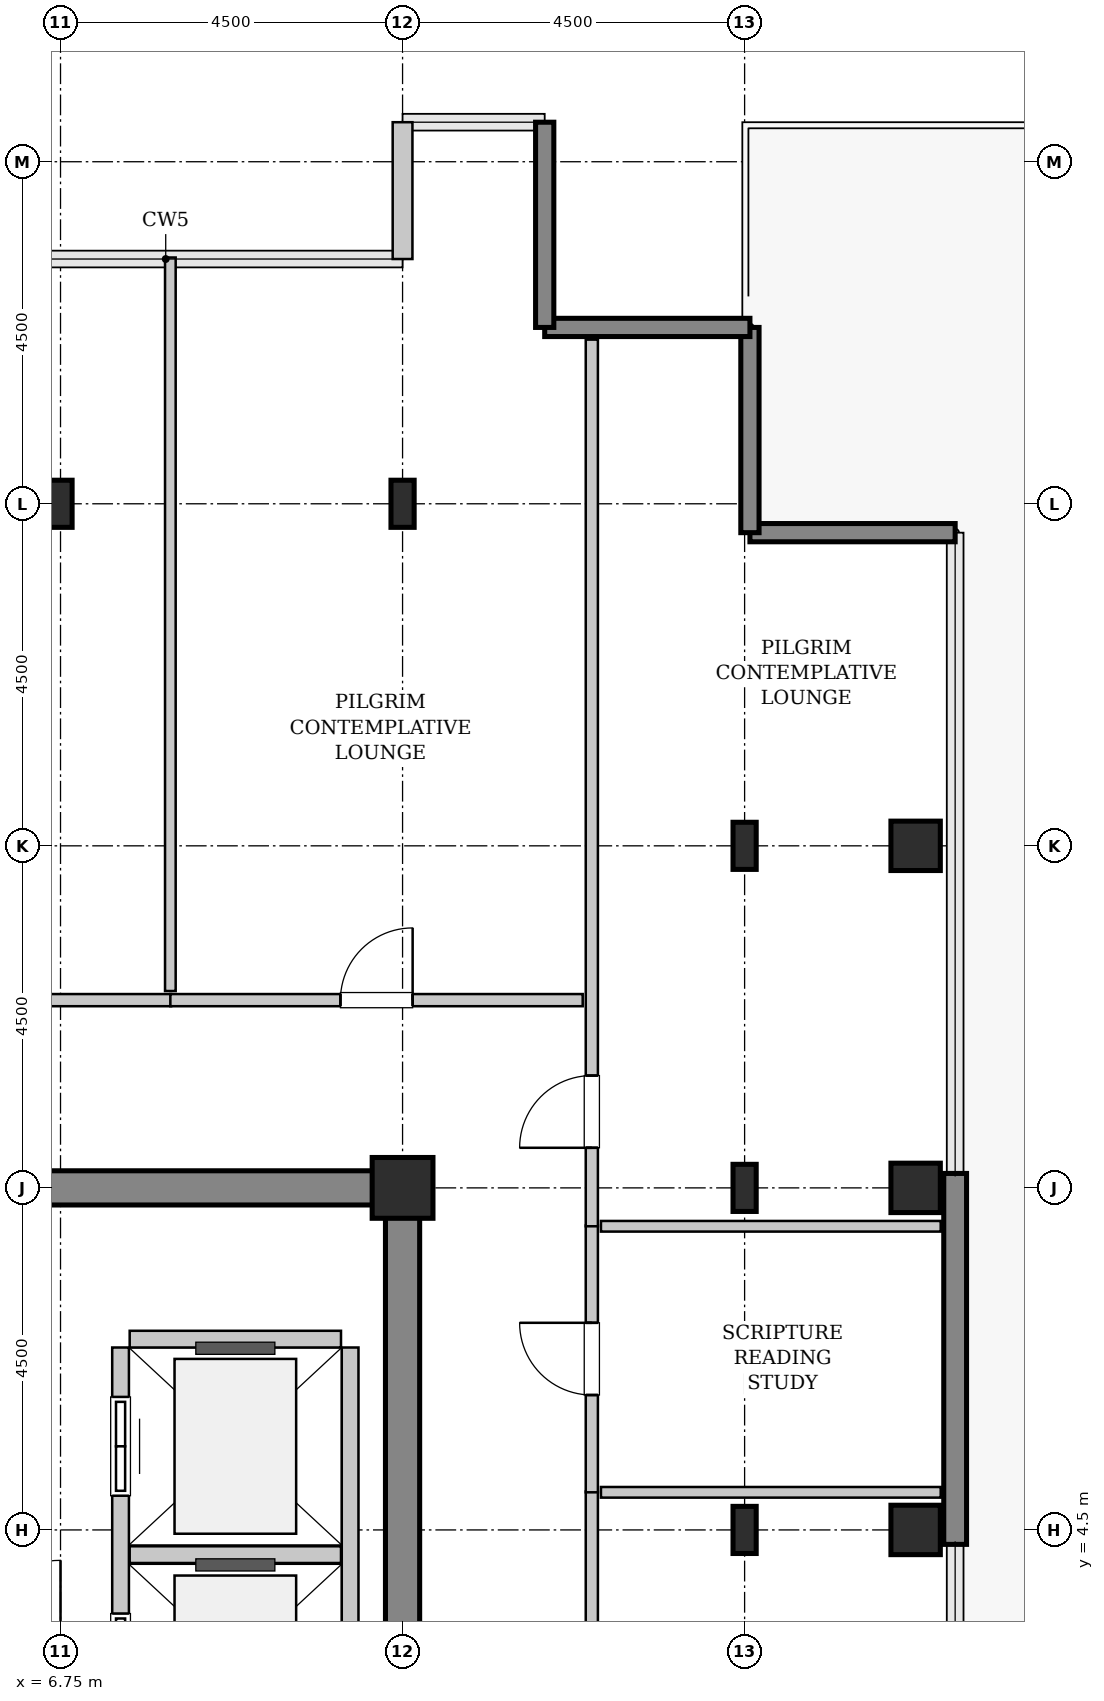
"""IFC4 building model, lengths in metres.
Left out: names, types, materials, properties, quantities, classifications, styles, units other than length and angle.
Written with IfcOpenShell. Run it as: python <this file> out.ifc"""

import sys

from ifc_helpers import new_model, si_unit, direction, frame, frame_2d, origin, origin_2d, place, context, subcontext, project, spatial, rectangle, hollow_rectangle, i_section, extrude, source, transform, mapped, element, fill, save


model = new_model("IFC4")
c1 = context("Model", 3, precision=1e-05, world=origin(), true_north=direction((0.0, 1.0)))
c2 = subcontext(c1, "Body", "Model", "MODEL_VIEW")
j1 = project(units=[si_unit("LENGTHUNIT", "METRE"), si_unit("PLANEANGLEUNIT", "RADIAN")], contexts=[c1])
p1 = place(None, origin())
s1 = spatial("IfcSite", under=j1, at=p1, CompositionType="ELEMENT")
p2 = place(p1, origin())
s2 = spatial("IfcBuilding", under=s1, at=p2, CompositionType="ELEMENT")
p3 = place(p2, frame((0.0, 0.0, 264.6)))
s3 = spatial("IfcBuildingStorey", under=s2, at=p3, CompositionType="ELEMENT", Elevation=264.6)
m1 = source(origin(), c2, "Body", "SweptSolid", [
    extrude(rectangle(XDim=9.925, YDim=0.45, at=frame_2d((4.962, 0.0))), origin(), (0.0, 0.0, 1.0), 3.8),
])
p4 = place(p3, frame((1.55, 9.0, 0.0), z_axis=(0.0, 0.0, 1.0), x_axis=(1.0, 0.0, 0.0)))
e1 = element("IfcWall", 1, at=p4, inside=s3, PredefinedType="SHEAR", context=c2, shape_type="MappedRepresentation", body=[
    mapped(m1, transform((0.0, 0.0, 0.0), x_axis=(1.0, 0.0, 0.0), y_axis=(0.0, 1.0, 0.0), z_axis=(0.0, 0.0, 1.0), scale=1.0)),
])
m2 = source(origin(), c2, "Body", "SweptSolid", [
    extrude(rectangle(XDim=7.425, YDim=0.45, at=frame_2d((3.712, 0.0))), origin(), (0.0, 0.0, 1.0), 3.8),
])
p5 = place(p3, frame((11.25, 1.35, 0.0), z_axis=(0.0, 0.0, 1.0), x_axis=(0.0, 1.0, 0.0)))
e2 = element("IfcWall", 2, at=p5, inside=s3, PredefinedType="SHEAR", context=c2, shape_type="MappedRepresentation", body=[
    mapped(m2, transform((0.0, 0.0, 0.0), x_axis=(1.0, 0.0, 0.0), y_axis=(0.0, 1.0, 0.0), z_axis=(0.0, 0.0, 1.0), scale=1.0)),
])
m3 = source(origin(), c2, "Body", "SweptSolid", [
    extrude(i_section(OverallWidth=0.305, OverallDepth=0.62, WebThickness=0.021, FlangeThickness=0.04, FilletRadius=0.027, at=origin_2d()), origin(), (0.0, 0.0, 1.0), 3.8),
])
p6 = place(p3, frame((6.75, 18.0, 0.0), z_axis=(0.0, 0.0, 1.0), x_axis=(1.0, 0.0, 0.0)))
e3 = element("IfcColumn", 3, at=p6, inside=s3, PredefinedType="COLUMN", context=c2, shape_type="MappedRepresentation", body=[
    mapped(m3, transform((0.0, 0.0, 0.0), x_axis=(1.0, 0.0, 0.0), y_axis=(0.0, 1.0, 0.0), z_axis=(0.0, 0.0, 1.0), scale=1.0)),
])
m4 = source(origin(), c2, "Body", "SweptSolid", [
    extrude(hollow_rectangle(XDim=0.8, YDim=0.8, WallThickness=0.04, InnerFilletRadius=0.04, OuterFilletRadius=0.08, at=origin_2d()), origin(), (0.0, 0.0, 1.0), 3.8),
])
p7 = place(p3, frame((11.25, 9.0, 0.0), z_axis=(0.0, 0.0, 1.0), x_axis=(1.0, 0.0, 0.0)))
e4 = element("IfcColumn", 4, at=p7, inside=s3, PredefinedType="COLUMN", context=c2, shape_type="MappedRepresentation", body=[
    mapped(m4, transform((0.0, 0.0, 0.0), x_axis=(1.0, 0.0, 0.0), y_axis=(0.0, 1.0, 0.0), z_axis=(0.0, 0.0, 1.0), scale=1.0)),
])
for number, where, z_axis, x_axis in (
    (5, (11.25, 18.0, 0.0), (0.0, 0.0, 1.0), (1.0, 0.0, 0.0)),
    (6, (15.75, 4.5, 0.0), (0.0, 0.0, 1.0), (1.0, 0.0, 0.0)),
    (7, (15.75, 9.0, 0.0), (0.0, 0.0, 1.0), (1.0, 0.0, 0.0)),
    (8, (15.75, 13.5, 0.0), (0.0, 0.0, 1.0), (1.0, 0.0, 0.0)),
):
    element("IfcColumn", number, at=place(p3, frame(where, z_axis=z_axis, x_axis=x_axis)), inside=s3, PredefinedType="COLUMN", context=c2, shape_type="MappedRepresentation", body=[
        mapped(m3, transform((0.0, 0.0, 0.0), x_axis=(1.0, 0.0, 0.0), y_axis=(0.0, 1.0, 0.0), z_axis=(0.0, 0.0, 1.0), scale=1.0)),
    ])
m5 = source(origin(), c2, "Body", "SweptSolid", [
    extrude(hollow_rectangle(XDim=0.65, YDim=0.65, WallThickness=0.032, InnerFilletRadius=0.032, OuterFilletRadius=0.064, at=origin_2d()), origin(), (0.0, 0.0, 1.0), 3.8),
])
for number, where, z_axis, x_axis in (
    (9, (18.0, 4.5, 0.0), (0.0, 0.0, 1.0), (1.0, 0.0, 0.0)),
    (10, (18.0, 9.0, 0.0), (0.0, 0.0, 1.0), (1.0, 0.0, 0.0)),
    (11, (18.0, 13.5, 0.0), (0.0, 0.0, 1.0), (1.0, 0.0, 0.0)),
):
    element("IfcColumn", number, at=place(p3, frame(where, z_axis=z_axis, x_axis=x_axis)), inside=s3, PredefinedType="COLUMN", context=c2, shape_type="MappedRepresentation", body=[
        mapped(m5, transform((0.0, 0.0, 0.0), x_axis=(1.0, 0.0, 0.0), y_axis=(0.0, 1.0, 0.0), z_axis=(0.0, 0.0, 1.0), scale=1.0)),
    ])
m6 = source(origin(), c2, "Body", "SweptSolid", [
    extrude(rectangle(XDim=4.88, YDim=0.3, at=frame_2d((2.44, 0.0))), origin(), (0.0, 0.0, 1.0), 3.55),
])
p8 = place(p3, frame((18.52, 4.31, 0.0), z_axis=(0.0, 0.0, 1.0), x_axis=(0.0, 1.0, 0.0)))
e12 = element("IfcWall", 12, at=p8, inside=s3, PredefinedType="SHEAR", context=c2, shape_type="MappedRepresentation", body=[
    mapped(m6, transform((0.0, 0.0, 0.0), x_axis=(1.0, 0.0, 0.0), y_axis=(0.0, 1.0, 0.0), z_axis=(0.0, 0.0, 1.0), scale=1.0)),
])
m7 = source(origin(), c2, "Body", "SweptSolid", [
    extrude(rectangle(XDim=2.7, YDim=0.24, at=frame_2d((1.35, 0.0))), origin(), (0.0, 0.0, 1.0), 3.55),
])
for number, where, z_axis, x_axis in (
    (13, (18.52, 17.62, 0.0), (0.0, 0.0, 1.0), (-1.0, 0.0, 0.0)),
    (14, (15.82, 17.62, 0.0), (0.0, 0.0, 1.0), (0.0, 1.0, 0.0)),
    (15, (15.82, 20.32, 0.0), (0.0, 0.0, 1.0), (-1.0, 0.0, 0.0)),
    (16, (13.12, 20.32, 0.0), (0.0, 0.0, 1.0), (0.0, 1.0, 0.0)),
):
    element("IfcWall", number, at=place(p3, frame(where, z_axis=z_axis, x_axis=x_axis)), inside=s3, PredefinedType="SHEAR", context=c2, shape_type="MappedRepresentation", body=[
        mapped(m7, transform((0.0, 0.0, 0.0), x_axis=(1.0, 0.0, 0.0), y_axis=(0.0, 1.0, 0.0), z_axis=(0.0, 0.0, 1.0), scale=1.0)),
    ])
m8 = source(origin(), c2, "Body", "SweptSolid", [
    extrude(rectangle(XDim=1.8, YDim=0.26, at=frame_2d((0.9, 0.0))), origin(), (0.0, 0.0, 1.0), 3.55),
])
p9 = place(p3, frame((11.25, 23.02, 0.0), z_axis=(0.0, 0.0, 1.0), x_axis=(0.0, -1.0, 0.0)))
e17 = element("IfcWall", 17, at=p9, inside=s3, PredefinedType="SOLIDWALL", context=c2, shape_type="MappedRepresentation", body=[
    mapped(m8, transform((0.0, 0.0, 0.0), x_axis=(1.0, 0.0, 0.0), y_axis=(0.0, 1.0, 0.0), z_axis=(0.0, 0.0, 1.0), scale=1.0)),
])
m9 = source(origin(), c2, "Body", "SweptSolid", [
    extrude(rectangle(XDim=5.45, YDim=0.22, at=frame_2d((2.725, 0.0))), origin(), (0.0, 0.0, 1.0), 3.535),
])
p10 = place(p3, frame((7.54, 6.9, 0.0), z_axis=(0.0, 0.0, 1.0), x_axis=(0.0, -1.0, 0.0)))
e18 = element("IfcWall", 18, at=p10, inside=s3, PredefinedType="SOLIDWALL", context=c2, shape_type="MappedRepresentation", body=[
    mapped(m9, transform((0.0, 0.0, 0.0), x_axis=(1.0, 0.0, 0.0), y_axis=(0.0, 1.0, 0.0), z_axis=(0.0, 0.0, 1.0), scale=1.0)),
])
p11 = place(p10, frame((3.5, 0.0, 0.0)))
e19 = element("IfcOpeningElement", 19, at=p11, cuts=e18, PredefinedType="OPENING", context=c2, shape_type="SweptSolid", body=[
    extrude(rectangle(XDim=1.3, YDim=2.3, at=frame_2d((0.65, 1.15))), frame((0.0, 0.12, 0.0), z_axis=(0.0, -1.0, 0.0), x_axis=(1.0, 0.0, 0.0)), (0.0, 0.0, 1.0), 0.24),
])
p12 = place(p10, frame((0.65, 0.0, 0.0)))
e20 = element("IfcOpeningElement", 20, at=p12, cuts=e18, PredefinedType="OPENING", context=c2, shape_type="SweptSolid", body=[
    extrude(rectangle(XDim=1.3, YDim=2.3, at=frame_2d((0.65, 1.15))), frame((0.0, 0.12, 0.0), z_axis=(0.0, -1.0, 0.0), x_axis=(1.0, 0.0, 0.0)), (0.0, 0.0, 1.0), 0.24),
])
p13 = place(p3, frame((10.56, 1.45, 0.0), z_axis=(0.0, 0.0, 1.0), x_axis=(0.0, 1.0, 0.0)))
e21 = element("IfcWall", 21, at=p13, inside=s3, PredefinedType="SOLIDWALL", context=c2, shape_type="MappedRepresentation", body=[
    mapped(m9, transform((0.0, 0.0, 0.0), x_axis=(1.0, 0.0, 0.0), y_axis=(0.0, 1.0, 0.0), z_axis=(0.0, 0.0, 1.0), scale=1.0)),
])
m10 = source(origin(), c2, "Body", "SweptSolid", [
    extrude(rectangle(XDim=2.78, YDim=0.22, at=frame_2d((1.39, 0.0))), origin(), (0.0, 0.0, 1.0), 3.535),
])
for number, where, z_axis, x_axis in (
    (22, (7.66, 4.175, 0.0), (0.0, 0.0, 1.0), (1.0, 0.0, 0.0)),
    (23, (10.44, 7.01, 0.0), (0.0, 0.0, 1.0), (-1.0, 0.0, 0.0)),
):
    element("IfcWall", number, at=place(p3, frame(where, z_axis=z_axis, x_axis=x_axis)), inside=s3, PredefinedType="SOLIDWALL", context=c2, shape_type="MappedRepresentation", body=[
        mapped(m10, transform((0.0, 0.0, 0.0), x_axis=(1.0, 0.0, 0.0), y_axis=(0.0, 1.0, 0.0), z_axis=(0.0, 0.0, 1.0), scale=1.0)),
    ])
m11 = source(origin(), c2, "Body", "SweptSolid", [
    extrude(rectangle(XDim=9.81, YDim=0.16, at=frame_2d((4.905, 0.0))), origin(), (0.0, 0.0, 1.0), 3.535),
])
p14 = place(p3, frame((13.74, -4.805, 0.0), z_axis=(0.0, 0.0, 1.0), x_axis=(0.0, 1.0, 0.0)))
e24 = element("IfcWall", 24, at=p14, inside=s3, PredefinedType="PARTITIONING", context=c2, shape_type="MappedRepresentation", body=[
    mapped(m11, transform((0.0, 0.0, 0.0), x_axis=(1.0, 0.0, 0.0), y_axis=(0.0, 1.0, 0.0), z_axis=(0.0, 0.0, 1.0), scale=1.0)),
])
p15 = place(p14, frame((4.43, 0.0, 0.0)))
e25 = element("IfcOpeningElement", 25, at=p15, cuts=e24, PredefinedType="OPENING", context=c2, shape_type="SweptSolid", body=[
    extrude(rectangle(XDim=0.95, YDim=2.1, at=frame_2d((0.475, 1.05))), frame((0.0, 0.09, 0.0), z_axis=(0.0, -1.0, 0.0), x_axis=(1.0, 0.0, 0.0)), (0.0, 0.0, 1.0), 0.18),
])
m12 = source(origin(), c2, "Body", "SweptSolid", [
    extrude(rectangle(XDim=4.47, YDim=0.14, at=frame_2d((2.235, 0.0))), origin(), (0.0, 0.0, 1.0), 2.925),
])
p16 = place(p3, frame((13.86, 4.995, 0.0), z_axis=(0.0, 0.0, 1.0), x_axis=(1.0, 0.0, 0.0)))
e26 = element("IfcWall", 26, at=p16, inside=s3, PredefinedType="PARTITIONING", context=c2, shape_type="MappedRepresentation", body=[
    mapped(m12, transform((0.0, 0.0, 0.0), x_axis=(1.0, 0.0, 0.0), y_axis=(0.0, 1.0, 0.0), z_axis=(0.0, 0.0, 1.0), scale=1.0)),
])
m13 = source(origin(), c2, "Body", "SweptSolid", [
    extrude(rectangle(XDim=3.51, YDim=0.16, at=frame_2d((1.755, 0.0))), origin(), (0.0, 0.0, 1.0), 3.535),
])
p17 = place(p3, frame((13.74, 4.995, 0.0), z_axis=(0.0, 0.0, 1.0), x_axis=(0.0, 1.0, 0.0)))
e27 = element("IfcWall", 27, at=p17, inside=s3, PredefinedType="PARTITIONING", context=c2, shape_type="MappedRepresentation", body=[
    mapped(m13, transform((0.0, 0.0, 0.0), x_axis=(1.0, 0.0, 0.0), y_axis=(0.0, 1.0, 0.0), z_axis=(0.0, 0.0, 1.0), scale=1.0)),
])
p18 = place(p17, frame((1.28, 0.0, 0.0)))
e28 = element("IfcOpeningElement", 28, at=p18, cuts=e27, PredefinedType="OPENING", context=c2, shape_type="SweptSolid", body=[
    extrude(rectangle(XDim=0.95, YDim=2.1, at=frame_2d((0.475, 1.05))), frame((0.0, 0.09, 0.0), z_axis=(0.0, -1.0, 0.0), x_axis=(1.0, 0.0, 0.0)), (0.0, 0.0, 1.0), 0.18),
])
p19 = place(p3, frame((13.86, 8.495, 0.0), z_axis=(0.0, 0.0, 1.0), x_axis=(1.0, 0.0, 0.0)))
e29 = element("IfcWall", 29, at=p19, inside=s3, PredefinedType="PARTITIONING", context=c2, shape_type="MappedRepresentation", body=[
    mapped(m12, transform((0.0, 0.0, 0.0), x_axis=(1.0, 0.0, 0.0), y_axis=(0.0, 1.0, 0.0), z_axis=(0.0, 0.0, 1.0), scale=1.0)),
])
m14 = source(origin(), c2, "Body", "SweptSolid", [
    extrude(rectangle(XDim=11.665, YDim=0.16, at=frame_2d((5.833, 0.0))), origin(), (0.0, 0.0, 1.0), 3.535),
])
p20 = place(p3, frame((13.74, 8.495, 0.0), z_axis=(0.0, 0.0, 1.0), x_axis=(0.0, 1.0, 0.0)))
e30 = element("IfcWall", 30, at=p20, inside=s3, PredefinedType="PARTITIONING", context=c2, shape_type="MappedRepresentation", body=[
    mapped(m14, transform((0.0, 0.0, 0.0), x_axis=(1.0, 0.0, 0.0), y_axis=(0.0, 1.0, 0.0), z_axis=(0.0, 0.0, 1.0), scale=1.0)),
])
p21 = place(p20, frame((1.032, 0.0, 0.0)))
e31 = element("IfcOpeningElement", 31, at=p21, cuts=e30, PredefinedType="OPENING", context=c2, shape_type="SweptSolid", body=[
    extrude(rectangle(XDim=0.95, YDim=2.1, at=frame_2d((0.475, 1.05))), frame((0.0, 0.09, 0.0), z_axis=(0.0, -1.0, 0.0), x_axis=(1.0, 0.0, 0.0)), (0.0, 0.0, 1.0), 0.18),
])
m15 = source(origin(), c2, "Body", "SweptSolid", [
    extrude(rectangle(XDim=5.81, YDim=0.16, at=frame_2d((2.905, 0.0))), origin(), (0.0, 0.0, 1.0), 3.535),
])
p22 = place(p3, frame((2.395, 11.47, 0.0), z_axis=(0.0, 0.0, 1.0), x_axis=(1.0, 0.0, 0.0)))
e32 = element("IfcWall", 32, at=p22, inside=s3, PredefinedType="PARTITIONING", context=c2, shape_type="MappedRepresentation", body=[
    mapped(m15, transform((0.0, 0.0, 0.0), x_axis=(1.0, 0.0, 0.0), y_axis=(0.0, 1.0, 0.0), z_axis=(0.0, 0.0, 1.0), scale=1.0)),
])
p23 = place(p22, frame((2.43, 0.0, 0.0)))
e33 = element("IfcOpeningElement", 33, at=p23, cuts=e32, PredefinedType="OPENING", context=c2, shape_type="SweptSolid", body=[
    extrude(rectangle(XDim=0.95, YDim=2.1, at=frame_2d((0.475, 1.05))), frame((0.0, 0.09, 0.0), z_axis=(0.0, -1.0, 0.0), x_axis=(1.0, 0.0, 0.0)), (0.0, 0.0, 1.0), 0.18),
])
m16 = source(origin(), c2, "Body", "SweptSolid", [
    extrude(rectangle(XDim=9.65, YDim=0.14, at=frame_2d((4.825, 0.0))), origin(), (0.0, 0.0, 1.0), 3.535),
])
p24 = place(p3, frame((8.195, 11.59, 0.0), z_axis=(0.0, 0.0, 1.0), x_axis=(0.0, 1.0, 0.0)))
e34 = element("IfcWall", 34, at=p24, inside=s3, PredefinedType="PARTITIONING", context=c2, shape_type="MappedRepresentation", body=[
    mapped(m16, transform((0.0, 0.0, 0.0), x_axis=(1.0, 0.0, 0.0), y_axis=(0.0, 1.0, 0.0), z_axis=(0.0, 0.0, 1.0), scale=1.0)),
])
m17 = source(origin(), c2, "Body", "SweptSolid", [
    extrude(rectangle(XDim=5.425, YDim=0.16, at=frame_2d((2.712, 0.0))), origin(), (0.0, 0.0, 1.0), 3.535),
])
p25 = place(p3, frame((8.195, 11.47, 0.0), z_axis=(0.0, 0.0, 1.0), x_axis=(1.0, 0.0, 0.0)))
e35 = element("IfcWall", 35, at=p25, inside=s3, PredefinedType="PARTITIONING", context=c2, shape_type="MappedRepresentation", body=[
    mapped(m17, transform((0.0, 0.0, 0.0), x_axis=(1.0, 0.0, 0.0), y_axis=(0.0, 1.0, 0.0), z_axis=(0.0, 0.0, 1.0), scale=1.0)),
])
p26 = place(p25, frame((2.238, 0.0, 0.0)))
e36 = element("IfcOpeningElement", 36, at=p26, cuts=e35, PredefinedType="OPENING", context=c2, shape_type="SweptSolid", body=[
    extrude(rectangle(XDim=0.95, YDim=2.1, at=frame_2d((0.475, 1.05))), frame((0.0, 0.09, 0.0), z_axis=(0.0, -1.0, 0.0), x_axis=(1.0, 0.0, 0.0)), (0.0, 0.0, 1.0), 0.18),
])
m18 = source(origin(), c2, "Body", "SweptSolid", [
    extrude(rectangle(XDim=1.3, YDim=2.3, at=frame_2d((0.65, 1.15))), frame((0.0, 0.025, 0.0), z_axis=(0.0, -1.0, 0.0), x_axis=(1.0, 0.0, 0.0)), (0.0, 0.0, 1.0), 0.05),
])
p27 = place(p11, origin())
e37 = element("IfcDoor", 37, at=p27, inside=s3, OperationType="SLIDING_TO_RIGHT", PredefinedType="DOOR", context=c2, shape_type="MappedRepresentation", body=[
    mapped(m18, transform((0.0, 0.0, 0.0), x_axis=(1.0, 0.0, 0.0), y_axis=(0.0, 1.0, 0.0), z_axis=(0.0, 0.0, 1.0), scale=1.0)),
])
fill(e19, e37)
p28 = place(p12, origin())
e38 = element("IfcDoor", 38, at=p28, inside=s3, OperationType="SLIDING_TO_RIGHT", PredefinedType="DOOR", context=c2, shape_type="MappedRepresentation", body=[
    mapped(m18, transform((0.0, 0.0, 0.0), x_axis=(1.0, 0.0, 0.0), y_axis=(0.0, 1.0, 0.0), z_axis=(0.0, 0.0, 1.0), scale=1.0)),
])
fill(e20, e38)
m19 = source(origin(), c2, "Body", "SweptSolid", [
    extrude(rectangle(XDim=0.95, YDim=2.1, at=frame_2d((0.475, 1.05))), frame((0.0, 0.025, 0.0), z_axis=(0.0, -1.0, 0.0), x_axis=(1.0, 0.0, 0.0)), (0.0, 0.0, 1.0), 0.05),
])
p29 = place(p18, origin())
e39 = element("IfcDoor", 39, at=p29, inside=s3, OperationType="SINGLE_SWING_RIGHT", PredefinedType="DOOR", context=c2, shape_type="MappedRepresentation", body=[
    mapped(m19, transform((0.0, 0.0, 0.0), x_axis=(1.0, 0.0, 0.0), y_axis=(0.0, 1.0, 0.0), z_axis=(0.0, 0.0, 1.0), scale=1.0)),
])
fill(e28, e39)
p30 = place(p21, origin())
e40 = element("IfcDoor", 40, at=p30, inside=s3, OperationType="SINGLE_SWING_LEFT", PredefinedType="DOOR", context=c2, shape_type="MappedRepresentation", body=[
    mapped(m19, transform((0.0, 0.0, 0.0), x_axis=(1.0, 0.0, 0.0), y_axis=(0.0, 1.0, 0.0), z_axis=(0.0, 0.0, 1.0), scale=1.0)),
])
fill(e31, e40)
p31 = place(p26, origin())
e41 = element("IfcDoor", 41, at=p31, inside=s3, OperationType="SINGLE_SWING_RIGHT", PredefinedType="DOOR", context=c2, shape_type="MappedRepresentation", body=[
    mapped(m19, transform((0.0, 0.0, 0.0), x_axis=(1.0, 0.0, 0.0), y_axis=(0.0, 1.0, 0.0), z_axis=(0.0, 0.0, 1.0), scale=1.0)),
])
fill(e36, e41)
save(model, sys.argv[1])
